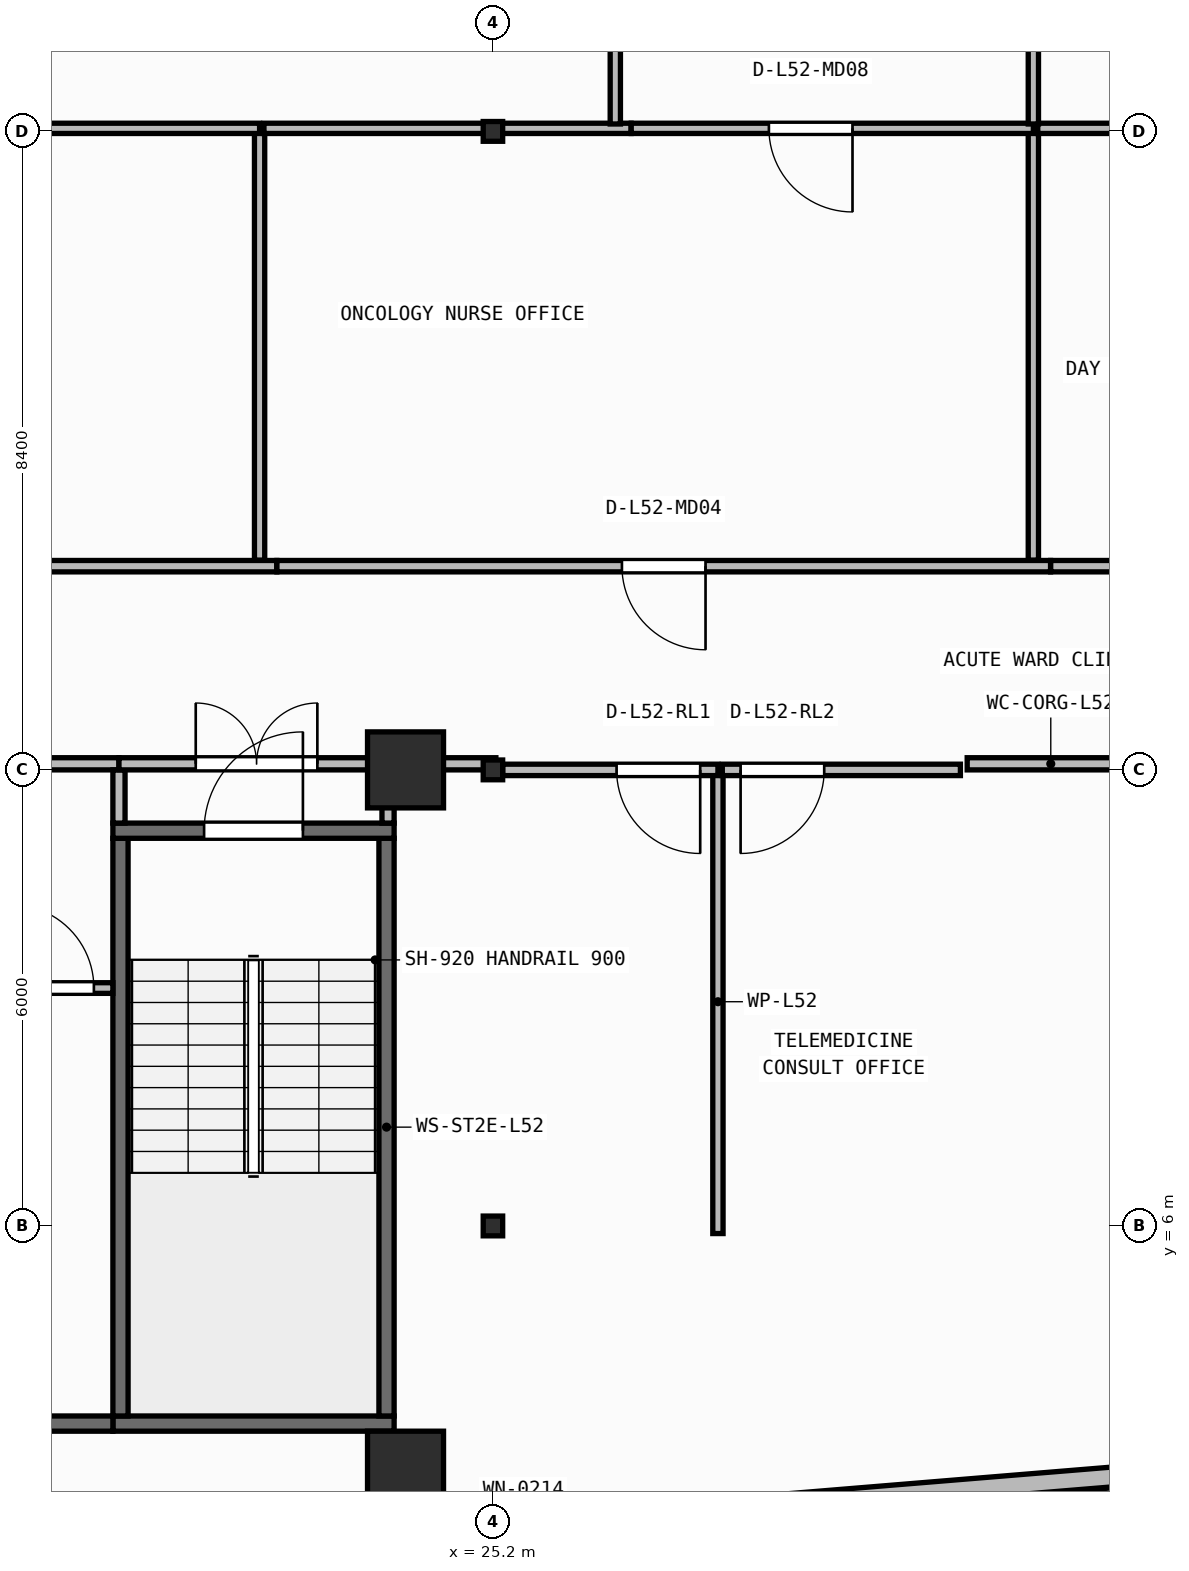
"""IFC4 building model, lengths in metres.
Left out: names, types, materials, properties, quantities, classifications, styles, units other than length and angle.
Written with IfcOpenShell. Run it as: python <this file> out.ifc"""

import sys

from ifc_helpers import new_model, si_unit, direction, frame, frame_2d, origin, origin_2d, place, context, subcontext, project, spatial, rectangle, i_section, extrude, element, fill, save


model = new_model("IFC4")
c1 = context("Model", 3, precision=1e-05, world=origin(), true_north=direction((0.0, 1.0)))
c2 = subcontext(c1, "Body", "Model", "MODEL_VIEW")
j1 = project(units=[si_unit("LENGTHUNIT", "METRE"), si_unit("PLANEANGLEUNIT", "RADIAN")], contexts=[c1])
p1 = place(None, origin())
s1 = spatial("IfcSite", under=j1, at=p1, CompositionType="ELEMENT")
p2 = place(p1, origin())
s2 = spatial("IfcBuilding", under=s1, at=p2, CompositionType="ELEMENT")
p3 = place(p2, frame((0.0, 0.0, 211.85)))
s3 = spatial("IfcBuildingStorey", under=s2, at=p3, CompositionType="ELEMENT", Elevation=211.85)
p4 = place(p3, frame((24.05, 2.8, 0.0), z_axis=(0.0, 0.0, 1.0), x_axis=(1.0, 0.0, 0.0)))
e1 = element("IfcColumn", 1, at=p4, inside=s3, PredefinedType="COLUMN", context=c2, shape_type="SweptSolid", body=[
    extrude(rectangle(XDim=1.0, YDim=1.0, at=origin_2d()), origin(), (0.0, 0.0, 1.0), 3.95),
])
p5 = place(p3, frame((25.2, 6.0, 0.0), z_axis=(0.0, 0.0, 1.0), x_axis=(1.0, 0.0, 0.0)))
e2 = element("IfcColumn", 2, at=p5, inside=s3, PredefinedType="COLUMN", context=c2, shape_type="SweptSolid", body=[
    extrude(i_section(OverallWidth=0.256, OverallDepth=0.26, WebThickness=0.01, FlangeThickness=0.017, FilletRadius=0.013, at=origin_2d()), origin(), (0.0, 0.0, 1.0), 3.95),
])
p6 = place(p3, frame((24.05, 12.0, 0.0), z_axis=(0.0, 0.0, 1.0), x_axis=(1.0, 0.0, 0.0)))
e3 = element("IfcColumn", 3, at=p6, inside=s3, PredefinedType="COLUMN", context=c2, shape_type="SweptSolid", body=[
    extrude(rectangle(XDim=1.0, YDim=1.0, at=origin_2d()), origin(), (0.0, 0.0, 1.0), 3.95),
])
for number, where, z_axis, x_axis in (
    (4, (25.2, 12.0, 0.0), (0.0, 0.0, 1.0), (1.0, 0.0, 0.0)),
    (5, (25.2, 20.4, 0.0), (0.0, 0.0, 1.0), (1.0, 0.0, 0.0)),
):
    element("IfcColumn", number, at=place(p3, frame(where, z_axis=z_axis, x_axis=x_axis)), inside=s3, PredefinedType="COLUMN", context=c2, shape_type="SweptSolid", body=[
        extrude(i_section(OverallWidth=0.256, OverallDepth=0.26, WebThickness=0.01, FlangeThickness=0.017, FilletRadius=0.013, at=origin_2d()), origin(), (0.0, 0.0, 1.0), 3.95),
    ])
p7 = place(p3, frame((2.66, 0.174, 0.0), z_axis=(0.0, 0.0, 1.0), x_axis=(0.996634028439, 0.081979347142, 0.0)))
e6 = element("IfcWall", 6, at=p7, inside=s3, PredefinedType="STANDARD", context=c2, shape_type="SweptSolid", body=[
    extrude(rectangle(XDim=46.035, YDim=0.26, at=frame_2d((23.018, 0.0))), origin(), (0.0, 0.0, 1.0), 3.71),
])
p8 = place(p7, frame((21.817, 0.0, 0.9)))
e7 = element("IfcOpeningElement", 7, at=p8, cuts=e6, PredefinedType="OPENING", context=c2, shape_type="SweptSolid", body=[
    extrude(rectangle(XDim=2.4, YDim=1.65, at=frame_2d((1.2, 0.825))), frame((0.0, 0.14, 0.0), z_axis=(0.0, -1.0, 0.0), x_axis=(1.0, 0.0, 0.0)), (0.0, 0.0, 1.0), 0.28),
])
p9 = place(p3, frame((20.2, 3.4, 0.0), z_axis=(0.0, 0.0, 1.0), x_axis=(1.0, 0.0, 0.0)))
e8 = element("IfcWall", 8, at=p9, inside=s3, PredefinedType="SHEAR", context=c2, shape_type="SweptSolid", body=[
    extrude(rectangle(XDim=3.7, YDim=0.2, at=frame_2d((1.85, 0.0))), origin(), (0.0, 0.0, 1.0), 3.71),
])
for number, where, z_axis, x_axis in (
    (9, (20.3, 3.5, 0.0), (0.0, 0.0, 1.0), (0.0, 1.0, 0.0)),
    (10, (23.8, 3.5, 0.0), (0.0, 0.0, 1.0), (0.0, 1.0, 0.0)),
):
    element("IfcWall", number, at=place(p3, frame(where, z_axis=z_axis, x_axis=x_axis)), inside=s3, PredefinedType="SHEAR", context=c2, shape_type="SweptSolid", body=[
        extrude(rectangle(XDim=7.6, YDim=0.2, at=frame_2d((3.8, 0.0))), origin(), (0.0, 0.0, 1.0), 3.71),
    ])
p10 = place(p3, frame((20.2, 11.2, 0.0), z_axis=(0.0, 0.0, 1.0), x_axis=(1.0, 0.0, 0.0)))
e11 = element("IfcWall", 11, at=p10, inside=s3, PredefinedType="SHEAR", context=c2, shape_type="SweptSolid", body=[
    extrude(rectangle(XDim=3.7, YDim=0.2, at=frame_2d((1.85, 0.0))), origin(), (0.0, 0.0, 1.0), 3.71),
])
p11 = place(p10, frame((1.2, 0.0, 0.0)))
e12 = element("IfcOpeningElement", 12, at=p11, cuts=e11, PredefinedType="OPENING", context=c2, shape_type="SweptSolid", body=[
    extrude(rectangle(XDim=1.3, YDim=2.15, at=frame_2d((0.65, 1.075))), frame((0.0, 0.11, 0.0), z_axis=(0.0, -1.0, 0.0), x_axis=(1.0, 0.0, 0.0)), (0.0, 0.0, 1.0), 0.22),
])
p12 = place(p3, frame((6.5, 3.4, 0.0), z_axis=(0.0, 0.0, 1.0), x_axis=(1.0, 0.0, 0.0)))
e13 = element("IfcWall", 13, at=p12, inside=s3, PredefinedType="SHEAR", context=c2, shape_type="SweptSolid", body=[
    extrude(rectangle(XDim=13.7, YDim=0.2, at=frame_2d((6.85, 0.0))), origin(), (0.0, 0.0, 1.0), 3.71),
])
p13 = place(p3, frame((18.61, 9.13, 0.0), z_axis=(0.0, 0.0, 1.0), x_axis=(1.0, 0.0, 0.0)))
e14 = element("IfcWall", 14, at=p13, inside=s3, PredefinedType="PARTITIONING", context=c2, shape_type="SweptSolid", body=[
    extrude(rectangle(XDim=1.59, YDim=0.14, at=frame_2d((0.795, 0.0))), origin(), (0.0, 0.0, 1.0), 3.71),
])
p14 = place(p13, frame((0.24, 0.0, 0.0)))
e15 = element("IfcOpeningElement", 15, at=p14, cuts=e14, PredefinedType="OPENING", context=c2, shape_type="SweptSolid", body=[
    extrude(rectangle(XDim=1.1, YDim=2.1, at=frame_2d((0.55, 1.05))), frame((0.0, 0.08, 0.0), z_axis=(0.0, -1.0, 0.0), x_axis=(1.0, 0.0, 0.0)), (0.0, 0.0, 1.0), 0.16),
])
p15 = place(p3, frame((12.58, 12.08, 0.0), z_axis=(0.0, 0.0, 1.0), x_axis=(1.0, 0.0, 0.0)))
e16 = element("IfcWall", 16, at=p15, inside=s3, PredefinedType="PARTITIONING", context=c2, shape_type="SweptSolid", body=[
    extrude(rectangle(XDim=7.7, YDim=0.16, at=frame_2d((3.85, 0.0))), origin(), (0.0, 0.0, 1.0), 3.152),
])
p16 = place(p15, frame((3.05, 0.0, 0.0)))
e17 = element("IfcOpeningElement", 17, at=p16, cuts=e16, PredefinedType="OPENING", context=c2, shape_type="SweptSolid", body=[
    extrude(rectangle(XDim=1.6, YDim=2.05, at=frame_2d((0.8, 1.025))), frame((0.0, 0.09, 0.0), z_axis=(0.0, -1.0, 0.0), x_axis=(1.0, 0.0, 0.0)), (0.0, 0.0, 1.0), 0.18),
])
p17 = place(p3, frame((20.28, 11.3, 0.0), z_axis=(0.0, 0.0, 1.0), x_axis=(0.0, 1.0, 0.0)))
e18 = element("IfcWall", 18, at=p17, inside=s3, PredefinedType="PARTITIONING", context=c2, shape_type="SweptSolid", body=[
    extrude(rectangle(XDim=0.7, YDim=0.16, at=frame_2d((0.35, 0.0))), origin(), (0.0, 0.0, 1.0), 3.71),
])
p18 = place(p3, frame((20.28, 12.08, 0.0), z_axis=(0.0, 0.0, 1.0), x_axis=(1.0, 0.0, 0.0)))
e19 = element("IfcWall", 19, at=p18, inside=s3, PredefinedType="PARTITIONING", context=c2, shape_type="SweptSolid", body=[
    extrude(rectangle(XDim=3.62, YDim=0.16, at=frame_2d((1.81, 0.0))), origin(), (0.0, 0.0, 1.0), 3.152),
])
p19 = place(p18, frame((1.01, 0.0, 0.0)))
e20 = element("IfcOpeningElement", 20, at=p19, cuts=e19, PredefinedType="OPENING", context=c2, shape_type="SweptSolid", body=[
    extrude(rectangle(XDim=1.6, YDim=2.05, at=frame_2d((0.8, 1.025))), frame((0.0, 0.09, 0.0), z_axis=(0.0, -1.0, 0.0), x_axis=(1.0, 0.0, 0.0)), (0.0, 0.0, 1.0), 0.18),
])
p20 = place(p3, frame((23.82, 11.3, 0.0), z_axis=(0.0, 0.0, 1.0), x_axis=(0.0, 1.0, 0.0)))
e21 = element("IfcWall", 21, at=p20, inside=s3, PredefinedType="PARTITIONING", context=c2, shape_type="SweptSolid", body=[
    extrude(rectangle(XDim=0.7, YDim=0.16, at=frame_2d((0.35, 0.0))), origin(), (0.0, 0.0, 1.0), 3.71),
])
p21 = place(p3, frame((28.16, 5.9, 0.0), z_axis=(0.0, 0.0, 1.0), x_axis=(0.0, 1.0, 0.0)))
e22 = element("IfcWall", 22, at=p21, inside=s3, PredefinedType="PARTITIONING", context=c2, shape_type="SweptSolid", body=[
    extrude(rectangle(XDim=6.1, YDim=0.135, at=frame_2d((3.05, 0.0))), origin(), (0.0, 0.0, 1.0), 3.71),
])
p22 = place(p3, frame((28.16, 12.0, 0.0), z_axis=(0.0, 0.0, 1.0), x_axis=(-1.0, 0.0, 0.0)))
e23 = element("IfcWall", 23, at=p22, inside=s3, PredefinedType="PARTITIONING", context=c2, shape_type="SweptSolid", body=[
    extrude(rectangle(XDim=2.832, YDim=0.15, at=frame_2d((1.416, 0.0))), origin(), (0.0, 0.0, 1.0), 3.152),
])
p23 = place(p22, frame((0.233, 0.0, 0.0)))
e24 = element("IfcOpeningElement", 24, at=p23, cuts=e23, PredefinedType="OPENING", context=c2, shape_type="SweptSolid", body=[
    extrude(rectangle(XDim=1.1, YDim=2.1, at=frame_2d((0.55, 1.05))), frame((0.0, 0.085, 0.0), z_axis=(0.0, -1.0, 0.0), x_axis=(1.0, 0.0, 0.0)), (0.0, 0.0, 1.0), 0.17),
])
p24 = place(p3, frame((31.35, 12.0, 0.0), z_axis=(0.0, 0.0, 1.0), x_axis=(-1.0, 0.0, 0.0)))
e25 = element("IfcWall", 25, at=p24, inside=s3, PredefinedType="PARTITIONING", context=c2, shape_type="SweptSolid", body=[
    extrude(rectangle(XDim=3.133, YDim=0.15, at=frame_2d((1.566, 0.0))), origin(), (0.0, 0.0, 1.0), 3.152),
])
p25 = place(p24, frame((1.792, 0.0, 0.0)))
e26 = element("IfcOpeningElement", 26, at=p25, cuts=e25, PredefinedType="OPENING", context=c2, shape_type="SweptSolid", body=[
    extrude(rectangle(XDim=1.1, YDim=2.1, at=frame_2d((0.55, 1.05))), frame((0.0, 0.085, 0.0), z_axis=(0.0, -1.0, 0.0), x_axis=(1.0, 0.0, 0.0)), (0.0, 0.0, 1.0), 0.17),
])
p26 = place(p3, frame((22.356, 14.68, 0.0), z_axis=(0.0, 0.0, 1.0), x_axis=(-1.0, 0.0, 0.0)))
e27 = element("IfcWall", 27, at=p26, inside=s3, PredefinedType="PARTITIONING", context=c2, shape_type="SweptSolid", body=[
    extrude(rectangle(XDim=8.802, YDim=0.15, at=frame_2d((4.401, 0.0))), origin(), (0.0, 0.0, 1.0), 3.71),
])
p27 = place(p26, frame((3.851, 0.0, 0.0)))
e28 = element("IfcOpeningElement", 28, at=p27, cuts=e27, PredefinedType="OPENING", context=c2, shape_type="SweptSolid", body=[
    extrude(rectangle(XDim=1.1, YDim=2.1, at=frame_2d((0.55, 1.05))), frame((0.0, 0.085, 0.0), z_axis=(0.0, -1.0, 0.0), x_axis=(1.0, 0.0, 0.0)), (0.0, 0.0, 1.0), 0.17),
])
p28 = place(p3, frame((32.536, 14.68, 0.0), z_axis=(0.0, 0.0, 1.0), x_axis=(-1.0, 0.0, 0.0)))
e29 = element("IfcWall", 29, at=p28, inside=s3, PredefinedType="PARTITIONING", context=c2, shape_type="SweptSolid", body=[
    extrude(rectangle(XDim=10.178, YDim=0.15, at=frame_2d((5.089, 0.0))), origin(), (0.0, 0.0, 1.0), 3.71),
])
p29 = place(p28, frame((4.539, 0.0, 0.0)))
e30 = element("IfcOpeningElement", 30, at=p29, cuts=e29, PredefinedType="OPENING", context=c2, shape_type="SweptSolid", body=[
    extrude(rectangle(XDim=1.1, YDim=2.1, at=frame_2d((0.55, 1.05))), frame((0.0, 0.085, 0.0), z_axis=(0.0, -1.0, 0.0), x_axis=(1.0, 0.0, 0.0)), (0.0, 0.0, 1.0), 0.17),
])
p30 = place(p3, frame((45.626, 14.68, 0.0), z_axis=(0.0, 0.0, 1.0), x_axis=(-1.0, 0.0, 0.0)))
e31 = element("IfcWall", 31, at=p30, inside=s3, PredefinedType="PARTITIONING", context=c2, shape_type="SweptSolid", body=[
    extrude(rectangle(XDim=13.088, YDim=0.15, at=frame_2d((6.544, 0.0))), origin(), (0.0, 0.0, 1.0), 3.71),
])
p31 = place(p30, frame((5.994, 0.0, 0.0)))
e32 = element("IfcOpeningElement", 32, at=p31, cuts=e31, PredefinedType="OPENING", context=c2, shape_type="SweptSolid", body=[
    extrude(rectangle(XDim=1.1, YDim=2.1, at=frame_2d((0.55, 1.05))), frame((0.0, 0.085, 0.0), z_axis=(0.0, -1.0, 0.0), x_axis=(1.0, 0.0, 0.0)), (0.0, 0.0, 1.0), 0.17),
])
p32 = place(p3, frame((22.13, 14.76, 0.0), z_axis=(0.0, 0.0, 1.0), x_axis=(0.0, 1.0, 0.0)))
e33 = element("IfcWall", 33, at=p32, inside=s3, PredefinedType="PARTITIONING", context=c2, shape_type="SweptSolid", body=[
    extrude(rectangle(XDim=5.68, YDim=0.135, at=frame_2d((2.84, 0.0))), origin(), (0.0, 0.0, 1.0), 3.71),
])
p33 = place(p3, frame((22.13, 20.44, 0.0), z_axis=(0.0, 0.0, 1.0), x_axis=(-1.0, 0.0, 0.0)))
e34 = element("IfcWall", 34, at=p33, inside=s3, PredefinedType="PARTITIONING", context=c2, shape_type="SweptSolid", body=[
    extrude(rectangle(XDim=8.35, YDim=0.135, at=frame_2d((4.175, 0.0))), origin(), (0.0, 0.0, 1.0), 3.152),
])
p34 = place(p3, frame((32.31, 14.76, 0.0), z_axis=(0.0, 0.0, 1.0), x_axis=(0.0, 1.0, 0.0)))
e35 = element("IfcWall", 35, at=p34, inside=s3, PredefinedType="PARTITIONING", context=c2, shape_type="SweptSolid", body=[
    extrude(rectangle(XDim=5.68, YDim=0.135, at=frame_2d((2.84, 0.0))), origin(), (0.0, 0.0, 1.0), 3.71),
])
p35 = place(p3, frame((27.018, 20.44, 0.0), z_axis=(0.0, 0.0, 1.0), x_axis=(-1.0, 0.0, 0.0)))
e36 = element("IfcWall", 36, at=p35, inside=s3, PredefinedType="PARTITIONING", context=c2, shape_type="SweptSolid", body=[
    extrude(rectangle(XDim=4.83, YDim=0.135, at=frame_2d((2.415, 0.0))), origin(), (0.0, 0.0, 1.0), 3.152),
])
p36 = place(p3, frame((32.31, 20.44, 0.0), z_axis=(0.0, 0.0, 1.0), x_axis=(-1.0, 0.0, 0.0)))
e37 = element("IfcWall", 37, at=p36, inside=s3, PredefinedType="PARTITIONING", context=c2, shape_type="SweptSolid", body=[
    extrude(rectangle(XDim=5.291, YDim=0.135, at=frame_2d((2.645, 0.0))), origin(), (0.0, 0.0, 1.0), 3.152),
])
p37 = place(p36, frame((2.379, 0.0, 0.0)))
e38 = element("IfcOpeningElement", 38, at=p37, cuts=e37, PredefinedType="OPENING", context=c2, shape_type="SweptSolid", body=[
    extrude(rectangle(XDim=1.1, YDim=2.1, at=frame_2d((0.55, 1.05))), frame((0.0, 0.077, 0.0), z_axis=(0.0, -1.0, 0.0), x_axis=(1.0, 0.0, 0.0)), (0.0, 0.0, 1.0), 0.155),
])
p38 = place(p3, frame((41.872, 20.44, 0.0), z_axis=(0.0, 0.0, 1.0), x_axis=(-1.0, 0.0, 0.0)))
e39 = element("IfcWall", 39, at=p38, inside=s3, PredefinedType="PARTITIONING", context=c2, shape_type="SweptSolid", body=[
    extrude(rectangle(XDim=9.505, YDim=0.135, at=frame_2d((4.752, 0.0))), origin(), (0.0, 0.0, 1.0), 3.152),
])
p39 = place(p38, frame((3.402, 0.0, 0.0)))
e40 = element("IfcOpeningElement", 40, at=p39, cuts=e39, PredefinedType="OPENING", context=c2, shape_type="SweptSolid", body=[
    extrude(rectangle(XDim=1.1, YDim=2.1, at=frame_2d((0.55, 1.05))), frame((0.0, 0.077, 0.0), z_axis=(0.0, -1.0, 0.0), x_axis=(1.0, 0.0, 0.0)), (0.0, 0.0, 1.0), 0.155),
])
for number, where, z_axis, x_axis in (
    (41, (26.81, 20.498, 0.0), (0.0, 0.0, 1.0), (0.0, 1.0, 0.0)),
    (42, (32.31, 20.498, 0.0), (0.0, 0.0, 1.0), (0.0, 1.0, 0.0)),
):
    element("IfcWall", number, at=place(p3, frame(where, z_axis=z_axis, x_axis=x_axis)), inside=s3, PredefinedType="PARTITIONING", context=c2, shape_type="SweptSolid", body=[
        extrude(rectangle(XDim=6.642, YDim=0.135, at=frame_2d((3.321, 0.0))), origin(), (0.0, 0.0, 1.0), 3.71),
    ])
p40 = place(p3, frame((24.02, 12.08, 0.0), z_axis=(0.0, 0.0, 1.0), x_axis=(1.0, 0.0, 0.0)))
e43 = element("IfcWall", 43, at=p40, inside=s3, PredefinedType="PARTITIONING", context=c2, shape_type="SweptSolid", body=[
    extrude(rectangle(XDim=1.219, YDim=0.16, at=frame_2d((0.609, 0.0))), origin(), (0.0, 0.0, 1.0), 3.152),
])
p41 = place(p3, frame((31.439, 12.08, 0.0), z_axis=(0.0, 0.0, 1.0), x_axis=(1.0, 0.0, 0.0)))
e44 = element("IfcWall", 44, at=p41, inside=s3, PredefinedType="PARTITIONING", context=c2, shape_type="SweptSolid", body=[
    extrude(rectangle(XDim=2.199, YDim=0.16, at=frame_2d((1.1, 0.0))), origin(), (0.0, 0.0, 1.0), 3.152),
])
p42 = place(p11, origin())
e45 = element("IfcDoor", 45, at=p42, inside=s3, OperationType="SINGLE_SWING_RIGHT", PredefinedType="DOOR", context=c2, shape_type="SweptSolid", body=[
    extrude(rectangle(XDim=1.3, YDim=2.15, at=frame_2d((0.65, 1.075))), frame((0.0, 0.025, 0.0), z_axis=(0.0, -1.0, 0.0), x_axis=(1.0, 0.0, 0.0)), (0.0, 0.0, 1.0), 0.05),
])
fill(e12, e45)
p43 = place(p14, origin())
e46 = element("IfcDoor", 46, at=p43, inside=s3, OperationType="SINGLE_SWING_LEFT", PredefinedType="DOOR", context=c2, shape_type="SweptSolid", body=[
    extrude(rectangle(XDim=1.1, YDim=2.1, at=frame_2d((0.55, 1.05))), frame((0.0, 0.025, 0.0), z_axis=(0.0, -1.0, 0.0), x_axis=(1.0, 0.0, 0.0)), (0.0, 0.0, 1.0), 0.05),
])
fill(e15, e46)
p44 = place(p19, origin())
e47 = element("IfcDoor", 47, at=p44, inside=s3, OperationType="DOUBLE_DOOR_SINGLE_SWING", PredefinedType="DOOR", context=c2, shape_type="SweptSolid", body=[
    extrude(rectangle(XDim=1.6, YDim=2.05, at=frame_2d((0.8, 1.025))), frame((0.0, 0.025, 0.0), z_axis=(0.0, -1.0, 0.0), x_axis=(1.0, 0.0, 0.0)), (0.0, 0.0, 1.0), 0.05),
])
fill(e20, e47)
p45 = place(p23, origin())
e48 = element("IfcDoor", 48, at=p45, inside=s3, OperationType="SINGLE_SWING_LEFT", PredefinedType="DOOR", context=c2, shape_type="SweptSolid", body=[
    extrude(rectangle(XDim=1.1, YDim=2.1, at=frame_2d((0.55, 1.05))), frame((0.0, 0.025, 0.0), z_axis=(0.0, -1.0, 0.0), x_axis=(1.0, 0.0, 0.0)), (0.0, 0.0, 1.0), 0.05),
])
fill(e24, e48)
p46 = place(p25, origin())
e49 = element("IfcDoor", 49, at=p46, inside=s3, OperationType="SINGLE_SWING_RIGHT", PredefinedType="DOOR", context=c2, shape_type="SweptSolid", body=[
    extrude(rectangle(XDim=1.1, YDim=2.1, at=frame_2d((0.55, 1.05))), frame((0.0, 0.025, 0.0), z_axis=(0.0, -1.0, 0.0), x_axis=(1.0, 0.0, 0.0)), (0.0, 0.0, 1.0), 0.05),
])
fill(e26, e49)
p47 = place(p29, origin())
e50 = element("IfcDoor", 50, at=p47, inside=s3, OperationType="SINGLE_SWING_LEFT", PredefinedType="DOOR", context=c2, shape_type="SweptSolid", body=[
    extrude(rectangle(XDim=1.1, YDim=2.1, at=frame_2d((0.55, 1.05))), frame((0.0, 0.025, 0.0), z_axis=(0.0, -1.0, 0.0), x_axis=(1.0, 0.0, 0.0)), (0.0, 0.0, 1.0), 0.05),
])
fill(e30, e50)
p48 = place(p37, origin())
e51 = element("IfcDoor", 51, at=p48, inside=s3, OperationType="SINGLE_SWING_LEFT", PredefinedType="DOOR", context=c2, shape_type="SweptSolid", body=[
    extrude(rectangle(XDim=1.1, YDim=2.1, at=frame_2d((0.55, 1.05))), frame((0.0, 0.025, 0.0), z_axis=(0.0, -1.0, 0.0), x_axis=(1.0, 0.0, 0.0)), (0.0, 0.0, 1.0), 0.05),
])
fill(e38, e51)
save(model, sys.argv[1])
